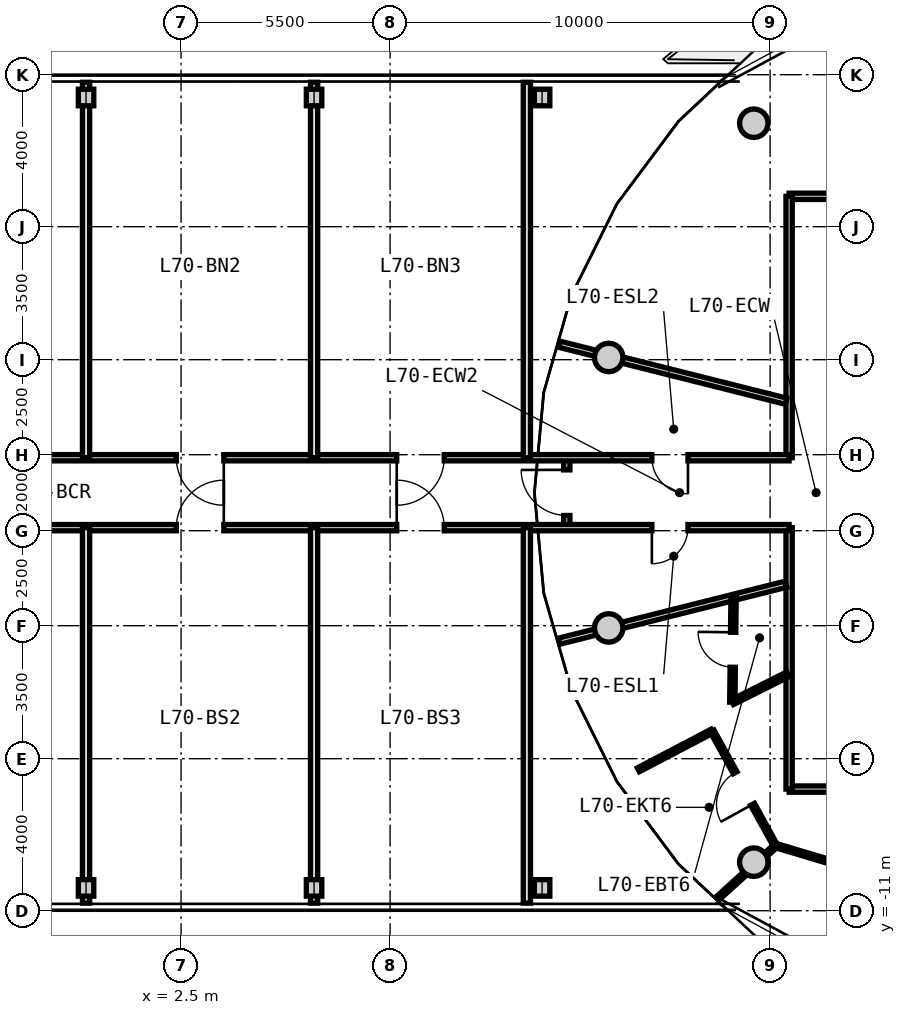
"""IFC4 building model, lengths in metres.
Left out: names, types, materials, properties, quantities, classifications, styles, units other than length and angle.
Written with IfcOpenShell. Run it as: python <this file> out.ifc"""

import sys

from ifc_helpers import new_model, si_unit, direction, frame, frame_2d, origin, origin_2d, place, context, subcontext, project, spatial, rectangle, circle, i_section, extrude, source, transform, mapped, element, fill, save


model = new_model("IFC4")
c1 = context("Model", 3, precision=1e-05, world=origin(), true_north=direction((0.0, 1.0)))
c2 = subcontext(c1, "Body", "Model", "MODEL_VIEW")
j1 = project(units=[si_unit("LENGTHUNIT", "METRE"), si_unit("PLANEANGLEUNIT", "RADIAN")], contexts=[c1])
p1 = place(None, origin())
s1 = spatial("IfcSite", under=j1, at=p1, CompositionType="ELEMENT")
p2 = place(p1, origin())
s2 = spatial("IfcBuilding", under=s1, at=p2, CompositionType="ELEMENT")
p3 = place(p2, frame((0.0, 0.0, 226.1)))
s3 = spatial("IfcBuildingStorey", under=s2, at=p3, CompositionType="ELEMENT", Elevation=226.1)
m1 = source(origin(), c2, "Body", "SweptSolid", [
    extrude(circle(Radius=0.375, at=origin_2d()), origin(), (0.0, 0.0, 1.0), 3.05),
])
for number, where, z_axis, x_axis in (
    (1, (17.57, 9.723, 0.0), (0.0, 0.0, 1.0), (1.0, 0.0, 0.0)),
    (2, (13.753, 3.559, 0.0), (0.0, 0.0, 1.0), (1.0, 0.0, 0.0)),
    (3, (13.753, -3.559, 0.0), (0.0, 0.0, 1.0), (1.0, 0.0, 0.0)),
    (4, (17.57, -9.723, 0.0), (0.0, 0.0, 1.0), (1.0, 0.0, 0.0)),
):
    element("IfcColumn", number, at=place(p3, frame(where, z_axis=z_axis, x_axis=x_axis)), inside=s3, PredefinedType="COLUMN", context=c2, shape_type="MappedRepresentation", body=[
        mapped(m1, transform((0.0, 0.0, 0.0), x_axis=(1.0, 0.0, 0.0), y_axis=(0.0, 1.0, 0.0), z_axis=(0.0, 0.0, 1.0), scale=1.0)),
    ])
m2 = source(origin(), c2, "Body", "SweptSolid", [
    extrude(i_section(OverallWidth=0.407, OverallDepth=0.435, WebThickness=0.024, FlangeThickness=0.039, FilletRadius=0.015, at=origin_2d()), origin(), (0.0, 0.0, 1.0), 3.05),
])
for number, where, z_axis, x_axis in (
    (5, (0.0, -10.4, 0.0), (0.0, 0.0, 1.0), (1.0, 0.0, 0.0)),
    (6, (0.0, 10.4, 0.0), (0.0, 0.0, 1.0), (1.0, 0.0, 0.0)),
    (7, (6.0, -10.4, 0.0), (0.0, 0.0, 1.0), (1.0, 0.0, 0.0)),
    (8, (6.0, 10.4, 0.0), (0.0, 0.0, 1.0), (1.0, 0.0, 0.0)),
    (9, (12.0, -10.4, 0.0), (0.0, 0.0, 1.0), (1.0, 0.0, 0.0)),
    (10, (12.0, 10.4, 0.0), (0.0, 0.0, 1.0), (1.0, 0.0, 0.0)),
):
    element("IfcColumn", number, at=place(p3, frame(where, z_axis=z_axis, x_axis=x_axis)), inside=s3, PredefinedType="COLUMN", context=c2, shape_type="MappedRepresentation", body=[
        mapped(m2, transform((0.0, 0.0, 0.0), x_axis=(1.0, 0.0, 0.0), y_axis=(0.0, 1.0, 0.0), z_axis=(0.0, 0.0, 1.0), scale=1.0)),
    ])
m3 = source(origin(), c2, "Body", "SweptSolid", [
    extrude(rectangle(XDim=8.58, YDim=0.165, at=frame_2d((4.29, 0.0))), origin(), (0.0, 0.0, 1.0), 2.745),
])
p4 = place(p3, frame((18.5, 7.8, 0.0), z_axis=(0.0, 0.0, 1.0), x_axis=(1.0, 0.0, 0.0)))
e11 = element("IfcWall", 11, at=p4, inside=s3, PredefinedType="PARTITIONING", context=c2, shape_type="MappedRepresentation", body=[
    mapped(m3, transform((0.0, 0.0, 0.0), x_axis=(1.0, 0.0, 0.0), y_axis=(0.0, 1.0, 0.0), z_axis=(0.0, 0.0, 1.0), scale=1.0)),
])
p5 = place(p4, frame((3.11, 0.0, 0.0)))
e12 = element("IfcOpeningElement", 12, at=p5, cuts=e11, PredefinedType="OPENING", context=c2, shape_type="SweptSolid", body=[
    extrude(rectangle(XDim=1.25, YDim=2.2, at=frame_2d((0.625, 1.1))), frame((0.0, 0.093, 0.0), z_axis=(0.0, -1.0, 0.0), x_axis=(1.0, 0.0, 0.0)), (0.0, 0.0, 1.0), 0.185),
])
m4 = source(origin(), c2, "Body", "SweptSolid", [
    extrude(rectangle(XDim=19.0, YDim=0.165, at=frame_2d((9.5, 0.0))), origin(), (0.0, 0.0, 1.0), 2.745),
])
p6 = place(p3, frame((37.5, -7.8, 0.0), z_axis=(0.0, 0.0, 1.0), x_axis=(-1.0, 0.0, 0.0)))
e13 = element("IfcWall", 13, at=p6, inside=s3, PredefinedType="PARTITIONING", context=c2, shape_type="MappedRepresentation", body=[
    mapped(m4, transform((0.0, 0.0, 0.0), x_axis=(1.0, 0.0, 0.0), y_axis=(0.0, 1.0, 0.0), z_axis=(0.0, 0.0, 1.0), scale=1.0)),
])
p7 = place(p6, frame((9.392, 0.0, 0.0)))
e14 = element("IfcOpeningElement", 14, at=p7, cuts=e13, PredefinedType="OPENING", context=c2, shape_type="SweptSolid", body=[
    extrude(rectangle(XDim=1.05, YDim=2.15, at=frame_2d((0.525, 1.075))), frame((0.0, 0.093, 0.0), z_axis=(0.0, -1.0, 0.0), x_axis=(1.0, 0.0, 0.0)), (0.0, 0.0, 1.0), 0.185),
])
m5 = source(origin(), c2, "Body", "SweptSolid", [
    extrude(rectangle(XDim=6.88, YDim=0.165, at=frame_2d((3.44, 0.0))), origin(), (0.0, 0.0, 1.0), 2.745),
])
for number, where, z_axis, x_axis in (
    (15, (18.5, -7.8, 0.0), (0.0, 0.0, 1.0), (0.0, 1.0, 0.0)),
    (16, (18.5, 0.92, 0.0), (0.0, 0.0, 1.0), (0.0, 1.0, 0.0)),
):
    element("IfcWall", number, at=place(p3, frame(where, z_axis=z_axis, x_axis=x_axis)), inside=s3, PredefinedType="PARTITIONING", context=c2, shape_type="MappedRepresentation", body=[
        mapped(m5, transform((0.0, 0.0, 0.0), x_axis=(1.0, 0.0, 0.0), y_axis=(0.0, 1.0, 0.0), z_axis=(0.0, 0.0, 1.0), scale=1.0)),
    ])
m6 = source(origin(), c2, "Body", "SweptSolid", [
    extrude(rectangle(XDim=6.157, YDim=0.165, at=frame_2d((3.079, 0.0))), origin(), (0.0, 0.0, 1.0), 2.345),
])
for number, where, z_axis, x_axis in (
    (17, (18.42, 2.407, 0.0), (0.0, 0.0, 1.0), (-0.97, 0.244, 0.0)),
    (18, (18.42, -2.407, 0.0), (0.0, 0.0, 1.0), (-0.97, -0.244, 0.0)),
):
    element("IfcWall", number, at=place(p3, frame(where, z_axis=z_axis, x_axis=x_axis)), inside=s3, PredefinedType="PARTITIONING", context=c2, shape_type="MappedRepresentation", body=[
        mapped(m6, transform((0.0, 0.0, 0.0), x_axis=(1.0, 0.0, 0.0), y_axis=(0.0, 1.0, 0.0), z_axis=(0.0, 0.0, 1.0), scale=1.0)),
    ])
m7 = source(origin(), c2, "Body", "SweptSolid", [
    extrude(rectangle(XDim=6.936, YDim=0.115, at=frame_2d((3.468, 0.0))), origin(), (0.0, 0.0, 1.0), 2.745),
])
p8 = place(p3, frame((18.151, -9.287, 0.0), z_axis=(0.0, 0.0, 1.0), x_axis=(0.958186895835, -0.286143098205, 0.0)))
e19 = element("IfcWall", 19, at=p8, inside=s3, PredefinedType="PARTITIONING", context=c2, shape_type="MappedRepresentation", body=[
    mapped(m7, transform((0.0, 0.0, 0.0), x_axis=(1.0, 0.0, 0.0), y_axis=(0.0, 1.0, 0.0), z_axis=(0.0, 0.0, 1.0), scale=1.0)),
])
p9 = place(p8, frame((2.993, 0.0, 0.0)))
e20 = element("IfcOpeningElement", 20, at=p9, cuts=e19, PredefinedType="OPENING", context=c2, shape_type="SweptSolid", body=[
    extrude(rectangle(XDim=0.95, YDim=2.1, at=frame_2d((0.475, 1.05))), frame((0.0, 0.067, 0.0), z_axis=(0.0, -1.0, 0.0), x_axis=(1.0, 0.0, 0.0)), (0.0, 0.0, 1.0), 0.135),
])
m8 = source(origin(), c2, "Body", "SweptSolid", [
    extrude(rectangle(XDim=2.072, YDim=0.115, at=frame_2d((1.036, 0.0))), origin(), (0.0, 0.0, 1.0), 2.345),
])
p10 = place(p3, frame((18.151, -9.287, 0.0), z_axis=(0.0, 0.0, 1.0), x_axis=(-0.741410125356, -0.671052178314, 0.0)))
e21 = element("IfcWall", 21, at=p10, inside=s3, PredefinedType="PARTITIONING", context=c2, shape_type="MappedRepresentation", body=[
    mapped(m8, transform((0.0, 0.0, 0.0), x_axis=(1.0, 0.0, 0.0), y_axis=(0.0, 1.0, 0.0), z_axis=(0.0, 0.0, 1.0), scale=1.0)),
])
m9 = source(origin(), c2, "Body", "SweptSolid", [
    extrude(rectangle(XDim=1.638, YDim=0.14, at=frame_2d((0.819, 0.0))), origin(), (0.0, 0.0, 1.0), 2.745),
])
p11 = place(p3, frame((18.47, -4.778, 0.0), z_axis=(0.0, 0.0, 1.0), x_axis=(-0.893919977945, -0.448226586707, 0.0)))
e22 = element("IfcWall", 22, at=p11, inside=s3, PredefinedType="PARTITIONING", context=c2, shape_type="MappedRepresentation", body=[
    mapped(m9, transform((0.0, 0.0, 0.0), x_axis=(1.0, 0.0, 0.0), y_axis=(0.0, 1.0, 0.0), z_axis=(0.0, 0.0, 1.0), scale=1.0)),
])
m10 = source(origin(), c2, "Body", "SweptSolid", [
    extrude(rectangle(XDim=2.759, YDim=0.14, at=frame_2d((1.379, 0.0))), origin(), (0.0, 0.0, 1.0), 2.745),
])
p12 = place(p3, frame((17.005, -5.513, 0.0), z_axis=(0.0, 0.0, 1.0), x_axis=(0.01194710728, 0.999928630767, 0.0)))
e23 = element("IfcWall", 23, at=p12, inside=s3, PredefinedType="PARTITIONING", context=c2, shape_type="MappedRepresentation", body=[
    mapped(m10, transform((0.0, 0.0, 0.0), x_axis=(1.0, 0.0, 0.0), y_axis=(0.0, 1.0, 0.0), z_axis=(0.0, 0.0, 1.0), scale=1.0)),
])
p13 = place(p12, frame((0.919, 0.0, 0.0)))
e24 = element("IfcOpeningElement", 24, at=p13, cuts=e23, PredefinedType="OPENING", context=c2, shape_type="SweptSolid", body=[
    extrude(rectangle(XDim=0.92, YDim=2.1, at=frame_2d((0.46, 1.05))), frame((0.0, 0.08, 0.0), z_axis=(0.0, -1.0, 0.0), x_axis=(1.0, 0.0, 0.0)), (0.0, 0.0, 1.0), 0.16),
])
m11 = source(origin(), c2, "Body", "SweptSolid", [
    extrude(rectangle(XDim=2.193, YDim=0.115, at=frame_2d((1.097, 0.0))), origin(), (0.0, 0.0, 1.0), 2.745),
])
p14 = place(p3, frame((16.475, -6.275, 0.0), z_axis=(0.0, 0.0, 1.0), x_axis=(-0.885783595046, -0.464098505435, 0.0)))
e25 = element("IfcWall", 25, at=p14, inside=s3, PredefinedType="PARTITIONING", context=c2, shape_type="MappedRepresentation", body=[
    mapped(m11, transform((0.0, 0.0, 0.0), x_axis=(1.0, 0.0, 0.0), y_axis=(0.0, 1.0, 0.0), z_axis=(0.0, 0.0, 1.0), scale=1.0)),
])
m12 = source(origin(), c2, "Body", "SweptSolid", [
    extrude(rectangle(XDim=3.45, YDim=0.115, at=frame_2d((1.725, 0.0))), origin(), (0.0, 0.0, 1.0), 2.745),
])
p15 = place(p3, frame((16.475, -6.275, 0.0), z_axis=(0.0, 0.0, 1.0), x_axis=(0.483659007882, -0.875256513312, 0.0)))
e26 = element("IfcWall", 26, at=p15, inside=s3, PredefinedType="PARTITIONING", context=c2, shape_type="MappedRepresentation", body=[
    mapped(m12, transform((0.0, 0.0, 0.0), x_axis=(1.0, 0.0, 0.0), y_axis=(0.0, 1.0, 0.0), z_axis=(0.0, 0.0, 1.0), scale=1.0)),
])
p16 = place(p15, frame((1.25, 0.0, 0.0)))
e27 = element("IfcOpeningElement", 27, at=p16, cuts=e26, PredefinedType="OPENING", context=c2, shape_type="SweptSolid", body=[
    extrude(rectangle(XDim=0.95, YDim=2.1, at=frame_2d((0.475, 1.05))), frame((0.0, 0.067, 0.0), z_axis=(0.0, -1.0, 0.0), x_axis=(1.0, 0.0, 0.0)), (0.0, 0.0, 1.0), 0.135),
])
m13 = source(origin(), c2, "Body", "SweptSolid", [
    extrude(rectangle(XDim=1.84, YDim=0.165, at=frame_2d((0.92, 0.0))), origin(), (0.0, 0.0, 1.0), 2.745),
])
p17 = place(p3, frame((12.65, -0.92, 0.0), z_axis=(0.0, 0.0, 1.0), x_axis=(0.0, 1.0, 0.0)))
e28 = element("IfcWall", 28, at=p17, inside=s3, PredefinedType="PARTITIONING", context=c2, shape_type="MappedRepresentation", body=[
    mapped(m13, transform((0.0, 0.0, 0.0), x_axis=(1.0, 0.0, 0.0), y_axis=(0.0, 1.0, 0.0), z_axis=(0.0, 0.0, 1.0), scale=1.0)),
])
p18 = place(p17, frame((0.32, 0.0, 0.0)))
e29 = element("IfcOpeningElement", 29, at=p18, cuts=e28, PredefinedType="OPENING", context=c2, shape_type="SweptSolid", body=[
    extrude(rectangle(XDim=1.2, YDim=2.15, at=frame_2d((0.6, 1.075))), frame((0.0, 0.093, 0.0), z_axis=(0.0, -1.0, 0.0), x_axis=(1.0, 0.0, 0.0)), (0.0, 0.0, 1.0), 0.185),
])
m14 = source(origin(), c2, "Body", "SweptSolid", [
    extrude(rectangle(XDim=37.0, YDim=0.165, at=frame_2d((18.5, 0.0))), origin(), (0.0, 0.0, 1.0), 2.745),
])
p19 = place(p3, frame((-18.5, -0.92, 0.0), z_axis=(0.0, 0.0, 1.0), x_axis=(1.0, 0.0, 0.0)))
e30 = element("IfcWall", 30, at=p19, inside=s3, PredefinedType="PARTITIONING", context=c2, shape_type="MappedRepresentation", body=[
    mapped(m14, transform((0.0, 0.0, 0.0), x_axis=(1.0, 0.0, 0.0), y_axis=(0.0, 1.0, 0.0), z_axis=(0.0, 0.0, 1.0), scale=1.0)),
])
p20 = place(p19, frame((2.662, 0.0, 0.0)))
e31 = element("IfcOpeningElement", 31, at=p20, cuts=e30, PredefinedType="OPENING", context=c2, shape_type="SweptSolid", body=[
    extrude(rectangle(XDim=0.95, YDim=2.1, at=frame_2d((0.475, 1.05))), frame((0.0, 0.093, 0.0), z_axis=(0.0, -1.0, 0.0), x_axis=(1.0, 0.0, 0.0)), (0.0, 0.0, 1.0), 0.185),
])
p21 = place(p19, frame((33.388, 0.0, 0.0)))
e32 = element("IfcOpeningElement", 32, at=p21, cuts=e30, PredefinedType="OPENING", context=c2, shape_type="SweptSolid", body=[
    extrude(rectangle(XDim=0.95, YDim=2.1, at=frame_2d((0.475, 1.05))), frame((0.0, 0.093, 0.0), z_axis=(0.0, -1.0, 0.0), x_axis=(1.0, 0.0, 0.0)), (0.0, 0.0, 1.0), 0.185),
])
p22 = place(p19, frame((12.71, 0.0, 0.0)))
e33 = element("IfcOpeningElement", 33, at=p22, cuts=e30, PredefinedType="OPENING", context=c2, shape_type="SweptSolid", body=[
    extrude(rectangle(XDim=1.25, YDim=2.2, at=frame_2d((0.625, 1.1))), frame((0.0, 0.093, 0.0), z_axis=(0.0, -1.0, 0.0), x_axis=(1.0, 0.0, 0.0)), (0.0, 0.0, 1.0), 0.185),
])
p23 = place(p19, frame((20.875, 0.0, 0.0)))
e34 = element("IfcOpeningElement", 34, at=p23, cuts=e30, PredefinedType="OPENING", context=c2, shape_type="SweptSolid", body=[
    extrude(rectangle(XDim=1.25, YDim=2.2, at=frame_2d((0.625, 1.1))), frame((0.0, 0.093, 0.0), z_axis=(0.0, -1.0, 0.0), x_axis=(1.0, 0.0, 0.0)), (0.0, 0.0, 1.0), 0.185),
])
p24 = place(p19, frame((26.675, 0.0, 0.0)))
e35 = element("IfcOpeningElement", 35, at=p24, cuts=e30, PredefinedType="OPENING", context=c2, shape_type="SweptSolid", body=[
    extrude(rectangle(XDim=1.25, YDim=2.2, at=frame_2d((0.625, 1.1))), frame((0.0, 0.093, 0.0), z_axis=(0.0, -1.0, 0.0), x_axis=(1.0, 0.0, 0.0)), (0.0, 0.0, 1.0), 0.185),
])
p25 = place(p3, frame((-18.5, 0.92, 0.0), z_axis=(0.0, 0.0, 1.0), x_axis=(1.0, 0.0, 0.0)))
e36 = element("IfcWall", 36, at=p25, inside=s3, PredefinedType="PARTITIONING", context=c2, shape_type="MappedRepresentation", body=[
    mapped(m14, transform((0.0, 0.0, 0.0), x_axis=(1.0, 0.0, 0.0), y_axis=(0.0, 1.0, 0.0), z_axis=(0.0, 0.0, 1.0), scale=1.0)),
])
p26 = place(p25, frame((2.662, 0.0, 0.0)))
e37 = element("IfcOpeningElement", 37, at=p26, cuts=e36, PredefinedType="OPENING", context=c2, shape_type="SweptSolid", body=[
    extrude(rectangle(XDim=0.95, YDim=2.1, at=frame_2d((0.475, 1.05))), frame((0.0, 0.093, 0.0), z_axis=(0.0, -1.0, 0.0), x_axis=(1.0, 0.0, 0.0)), (0.0, 0.0, 1.0), 0.185),
])
p27 = place(p25, frame((33.388, 0.0, 0.0)))
e38 = element("IfcOpeningElement", 38, at=p27, cuts=e36, PredefinedType="OPENING", context=c2, shape_type="SweptSolid", body=[
    extrude(rectangle(XDim=0.95, YDim=2.1, at=frame_2d((0.475, 1.05))), frame((0.0, 0.093, 0.0), z_axis=(0.0, -1.0, 0.0), x_axis=(1.0, 0.0, 0.0)), (0.0, 0.0, 1.0), 0.185),
])
p28 = place(p25, frame((7.64, 0.0, 0.0)))
e39 = element("IfcOpeningElement", 39, at=p28, cuts=e36, PredefinedType="OPENING", context=c2, shape_type="SweptSolid", body=[
    extrude(rectangle(XDim=0.92, YDim=2.1, at=frame_2d((0.46, 1.05))), frame((0.0, 0.093, 0.0), z_axis=(0.0, -1.0, 0.0), x_axis=(1.0, 0.0, 0.0)), (0.0, 0.0, 1.0), 0.185),
])
p29 = place(p25, frame((13.275, 0.0, 0.0)))
e40 = element("IfcOpeningElement", 40, at=p29, cuts=e36, PredefinedType="OPENING", context=c2, shape_type="SweptSolid", body=[
    extrude(rectangle(XDim=1.25, YDim=2.2, at=frame_2d((0.625, 1.1))), frame((0.0, 0.093, 0.0), z_axis=(0.0, -1.0, 0.0), x_axis=(1.0, 0.0, 0.0)), (0.0, 0.0, 1.0), 0.185),
])
p30 = place(p25, frame((20.875, 0.0, 0.0)))
e41 = element("IfcOpeningElement", 41, at=p30, cuts=e36, PredefinedType="OPENING", context=c2, shape_type="SweptSolid", body=[
    extrude(rectangle(XDim=1.25, YDim=2.2, at=frame_2d((0.625, 1.1))), frame((0.0, 0.093, 0.0), z_axis=(0.0, -1.0, 0.0), x_axis=(1.0, 0.0, 0.0)), (0.0, 0.0, 1.0), 0.185),
])
p31 = place(p25, frame((26.675, 0.0, 0.0)))
e42 = element("IfcOpeningElement", 42, at=p31, cuts=e36, PredefinedType="OPENING", context=c2, shape_type="SweptSolid", body=[
    extrude(rectangle(XDim=1.25, YDim=2.2, at=frame_2d((0.625, 1.1))), frame((0.0, 0.093, 0.0), z_axis=(0.0, -1.0, 0.0), x_axis=(1.0, 0.0, 0.0)), (0.0, 0.0, 1.0), 0.185),
])
m15 = source(origin(), c2, "Body", "SweptSolid", [
    extrude(rectangle(XDim=9.88, YDim=0.19, at=frame_2d((4.94, 0.0))), origin(), (0.0, 0.0, 1.0), 2.745),
])
for number, where, z_axis, x_axis in (
    (43, (11.6, -10.8, 0.0), (0.0, 0.0, 1.0), (0.0, 1.0, 0.0)),
    (44, (11.6, 0.92, 0.0), (0.0, 0.0, 1.0), (0.0, 1.0, 0.0)),
):
    element("IfcWall", number, at=place(p3, frame(where, z_axis=z_axis, x_axis=x_axis)), inside=s3, PredefinedType="PARTITIONING", context=c2, shape_type="MappedRepresentation", body=[
        mapped(m15, transform((0.0, 0.0, 0.0), x_axis=(1.0, 0.0, 0.0), y_axis=(0.0, 1.0, 0.0), z_axis=(0.0, 0.0, 1.0), scale=1.0)),
    ])
m16 = source(origin(), c2, "Body", "SweptSolid", [
    extrude(rectangle(XDim=9.88, YDim=0.19, at=frame_2d((4.94, 0.0))), origin(), (0.0, 0.0, 1.0), 2.045),
])
for number, where, z_axis, x_axis in (
    (45, (0.0, -10.8, 0.0), (0.0, 0.0, 1.0), (0.0, 1.0, 0.0)),
    (46, (0.0, 0.92, 0.0), (0.0, 0.0, 1.0), (0.0, 1.0, 0.0)),
    (47, (6.0, -10.8, 0.0), (0.0, 0.0, 1.0), (0.0, 1.0, 0.0)),
    (48, (6.0, 0.92, 0.0), (0.0, 0.0, 1.0), (0.0, 1.0, 0.0)),
):
    element("IfcWall", number, at=place(p3, frame(where, z_axis=z_axis, x_axis=x_axis)), inside=s3, PredefinedType="PARTITIONING", context=c2, shape_type="MappedRepresentation", body=[
        mapped(m16, transform((0.0, 0.0, 0.0), x_axis=(1.0, 0.0, 0.0), y_axis=(0.0, 1.0, 0.0), z_axis=(0.0, 0.0, 1.0), scale=1.0)),
    ])
m17 = source(origin(), c2, "Body", "SweptSolid", [
    extrude(rectangle(XDim=0.95, YDim=2.1, at=frame_2d((0.475, 1.05))), frame((0.0, 0.025, 0.0), z_axis=(0.0, -1.0, 0.0), x_axis=(1.0, 0.0, 0.0)), (0.0, 0.0, 1.0), 0.05),
])
p32 = place(p21, frame((0.95, 0.0, 0.0), z_axis=(0.0, 0.0, 1.0), x_axis=(-1.0, 0.0, 0.0)))
e49 = element("IfcDoor", 49, at=p32, inside=s3, OperationType="SINGLE_SWING_RIGHT", PredefinedType="DOOR", context=c2, shape_type="MappedRepresentation", body=[
    mapped(m17, transform((0.0, 0.0, 0.0), x_axis=(1.0, 0.0, 0.0), y_axis=(0.0, 1.0, 0.0), z_axis=(0.0, 0.0, 1.0), scale=1.0)),
])
fill(e32, e49)
p33 = place(p27, frame((0.95, 0.0, 0.0), z_axis=(0.0, 0.0, 1.0), x_axis=(-1.0, 0.0, 0.0)))
e50 = element("IfcDoor", 50, at=p33, inside=s3, OperationType="SINGLE_SWING_LEFT", PredefinedType="DOOR", context=c2, shape_type="MappedRepresentation", body=[
    mapped(m17, transform((0.0, 0.0, 0.0), x_axis=(1.0, 0.0, 0.0), y_axis=(0.0, 1.0, 0.0), z_axis=(0.0, 0.0, 1.0), scale=1.0)),
])
fill(e38, e50)
m18 = source(origin(), c2, "Body", "SweptSolid", [
    extrude(rectangle(XDim=0.92, YDim=2.1, at=frame_2d((0.46, 1.05))), frame((0.0, 0.025, 0.0), z_axis=(0.0, -1.0, 0.0), x_axis=(1.0, 0.0, 0.0)), (0.0, 0.0, 1.0), 0.05),
])
p34 = place(p13, origin())
e51 = element("IfcDoor", 51, at=p34, inside=s3, OperationType="SINGLE_SWING_RIGHT", PredefinedType="DOOR", context=c2, shape_type="MappedRepresentation", body=[
    mapped(m18, transform((0.0, 0.0, 0.0), x_axis=(1.0, 0.0, 0.0), y_axis=(0.0, 1.0, 0.0), z_axis=(0.0, 0.0, 1.0), scale=1.0)),
])
fill(e24, e51)
p35 = place(p16, frame((0.95, 0.0, 0.0), z_axis=(0.0, 0.0, 1.0), x_axis=(-1.0, 0.0, 0.0)))
e52 = element("IfcDoor", 52, at=p35, inside=s3, OperationType="SINGLE_SWING_LEFT", PredefinedType="DOOR", context=c2, shape_type="MappedRepresentation", body=[
    mapped(m17, transform((0.0, 0.0, 0.0), x_axis=(1.0, 0.0, 0.0), y_axis=(0.0, 1.0, 0.0), z_axis=(0.0, 0.0, 1.0), scale=1.0)),
])
fill(e27, e52)
m19 = source(origin(), c2, "Body", "SweptSolid", [
    extrude(rectangle(XDim=1.2, YDim=2.15, at=frame_2d((0.6, 1.075))), frame((0.0, 0.025, 0.0), z_axis=(0.0, -1.0, 0.0), x_axis=(1.0, 0.0, 0.0)), (0.0, 0.0, 1.0), 0.05),
])
p36 = place(p18, origin())
e53 = element("IfcDoor", 53, at=p36, inside=s3, OperationType="SINGLE_SWING_RIGHT", PredefinedType="DOOR", context=c2, shape_type="MappedRepresentation", body=[
    mapped(m19, transform((0.0, 0.0, 0.0), x_axis=(1.0, 0.0, 0.0), y_axis=(0.0, 1.0, 0.0), z_axis=(0.0, 0.0, 1.0), scale=1.0)),
])
fill(e29, e53)
m20 = source(origin(), c2, "Body", "SweptSolid", [
    extrude(rectangle(XDim=1.25, YDim=2.2, at=frame_2d((0.625, 1.1))), frame((0.0, 0.025, 0.0), z_axis=(0.0, -1.0, 0.0), x_axis=(1.0, 0.0, 0.0)), (0.0, 0.0, 1.0), 0.05),
])
p37 = place(p23, origin())
e54 = element("IfcDoor", 54, at=p37, inside=s3, OperationType="SINGLE_SWING_RIGHT", PredefinedType="DOOR", context=c2, shape_type="MappedRepresentation", body=[
    mapped(m20, transform((0.0, 0.0, 0.0), x_axis=(1.0, 0.0, 0.0), y_axis=(0.0, 1.0, 0.0), z_axis=(0.0, 0.0, 1.0), scale=1.0)),
])
fill(e34, e54)
p38 = place(p30, frame((1.25, 0.0, 0.0), z_axis=(0.0, 0.0, 1.0), x_axis=(-1.0, 0.0, 0.0)))
e55 = element("IfcDoor", 55, at=p38, inside=s3, OperationType="SINGLE_SWING_LEFT", PredefinedType="DOOR", context=c2, shape_type="MappedRepresentation", body=[
    mapped(m20, transform((0.0, 0.0, 0.0), x_axis=(1.0, 0.0, 0.0), y_axis=(0.0, 1.0, 0.0), z_axis=(0.0, 0.0, 1.0), scale=1.0)),
])
fill(e41, e55)
p39 = place(p24, origin())
e56 = element("IfcDoor", 56, at=p39, inside=s3, OperationType="SINGLE_SWING_LEFT", PredefinedType="DOOR", context=c2, shape_type="MappedRepresentation", body=[
    mapped(m20, transform((0.0, 0.0, 0.0), x_axis=(1.0, 0.0, 0.0), y_axis=(0.0, 1.0, 0.0), z_axis=(0.0, 0.0, 1.0), scale=1.0)),
])
fill(e35, e56)
p40 = place(p31, frame((1.25, 0.0, 0.0), z_axis=(0.0, 0.0, 1.0), x_axis=(-1.0, 0.0, 0.0)))
e57 = element("IfcDoor", 57, at=p40, inside=s3, OperationType="SINGLE_SWING_RIGHT", PredefinedType="DOOR", context=c2, shape_type="MappedRepresentation", body=[
    mapped(m20, transform((0.0, 0.0, 0.0), x_axis=(1.0, 0.0, 0.0), y_axis=(0.0, 1.0, 0.0), z_axis=(0.0, 0.0, 1.0), scale=1.0)),
])
fill(e42, e57)
save(model, sys.argv[1])
